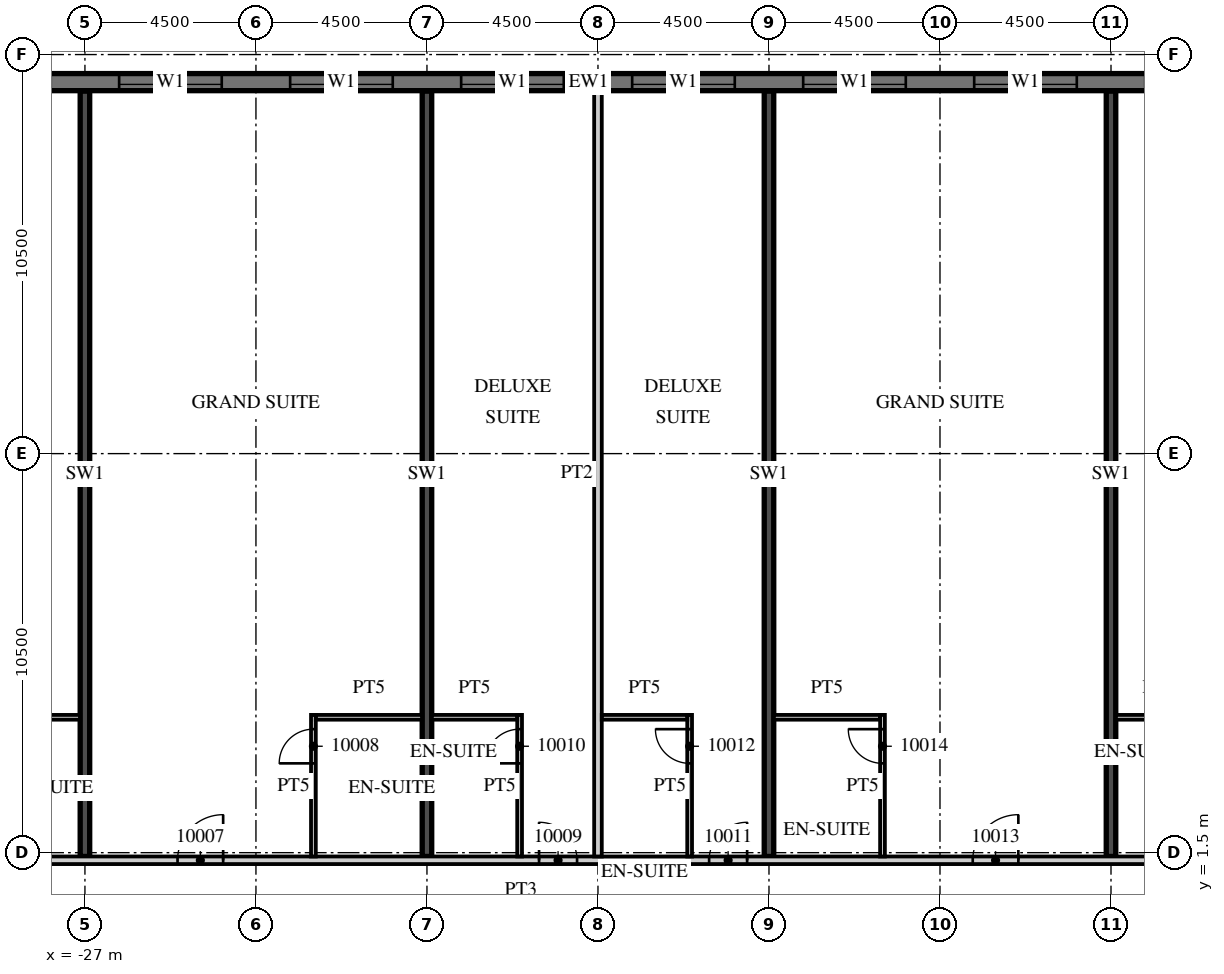
"""IFC4 building model, lengths in metres.
Left out: names, types, materials, properties, quantities, classifications, styles, units other than length and angle.
Written with IfcOpenShell. Run it as: python <this file> out.ifc"""

import sys

from ifc_helpers import new_model, si_unit, direction, frame, frame_2d, origin, place, context, subcontext, project, spatial, rectangle, extrude, element, fill, save


model = new_model("IFC4")
c1 = context("Model", 3, precision=1e-05, world=origin(), true_north=direction((0.0, 1.0)))
c2 = subcontext(c1, "Body", "Model", "MODEL_VIEW")
j1 = project(units=[si_unit("LENGTHUNIT", "METRE"), si_unit("PLANEANGLEUNIT", "RADIAN")], contexts=[c1])
p1 = place(None, origin())
s1 = spatial("IfcSite", under=j1, at=p1, CompositionType="ELEMENT")
p2 = place(p1, origin())
s2 = spatial("IfcBuilding", under=s1, at=p2, CompositionType="ELEMENT")
p3 = place(p2, frame((0.0, 0.0, 63.3)))
s3 = spatial("IfcBuildingStorey", under=s2, at=p3, CompositionType="ELEMENT", Elevation=63.3)
for number, where, z_axis, x_axis in (
    (1, (-27.0, 1.4, 0.0), (0.0, 0.0, 1.0), (0.0, 1.0, 0.0)),
    (2, (-18.0, 1.4, 0.0), (0.0, 0.0, 1.0), (0.0, 1.0, 0.0)),
    (3, (-9.0, 1.4, 0.0), (0.0, 0.0, 1.0), (0.0, 1.0, 0.0)),
    (4, (0.0, 1.4, 0.0), (0.0, 0.0, 1.0), (0.0, 1.0, 0.0)),
):
    element("IfcWall", number, at=place(p3, frame(where, z_axis=z_axis, x_axis=x_axis)), inside=s3, PredefinedType="SHEAR", context=c2, shape_type="SweptSolid", body=[
        extrude(rectangle(XDim=20.14, YDim=0.25, at=frame_2d((10.07, 0.0))), origin(), (0.0, 0.0, 1.0), 3.3),
    ])
p4 = place(p3, frame((13.5, 21.775, 0.0), z_axis=(0.0, 0.0, 1.0), x_axis=(-1.0, 0.0, 0.0)))
e5 = element("IfcWall", 5, at=p4, inside=s3, PredefinedType="SOLIDWALL", context=c2, shape_type="SweptSolid", body=[
    extrude(rectangle(XDim=54.5, YDim=0.45, at=frame_2d((27.25, 0.0))), origin(), (0.0, 0.0, 1.0), 3.02),
])
p5 = place(p4, frame((0.9, 0.0, 0.45)))
e6 = element("IfcOpeningElement", 6, at=p5, cuts=e5, PredefinedType="OPENING", context=c2, shape_type="SweptSolid", body=[
    extrude(rectangle(XDim=2.7, YDim=2.25, at=frame_2d((1.35, 1.125))), frame((0.0, 0.235, 0.0), z_axis=(0.0, -1.0, 0.0), x_axis=(1.0, 0.0, 0.0)), (0.0, 0.0, 1.0), 0.47),
])
p6 = place(p4, frame((5.4, 0.0, 0.45)))
e7 = element("IfcOpeningElement", 7, at=p6, cuts=e5, PredefinedType="OPENING", context=c2, shape_type="SweptSolid", body=[
    extrude(rectangle(XDim=2.7, YDim=2.25, at=frame_2d((1.35, 1.125))), frame((0.0, 0.235, 0.0), z_axis=(0.0, -1.0, 0.0), x_axis=(1.0, 0.0, 0.0)), (0.0, 0.0, 1.0), 0.47),
])
p7 = place(p4, frame((9.9, 0.0, 0.45)))
e8 = element("IfcOpeningElement", 8, at=p7, cuts=e5, PredefinedType="OPENING", context=c2, shape_type="SweptSolid", body=[
    extrude(rectangle(XDim=2.7, YDim=2.25, at=frame_2d((1.35, 1.125))), frame((0.0, 0.235, 0.0), z_axis=(0.0, -1.0, 0.0), x_axis=(1.0, 0.0, 0.0)), (0.0, 0.0, 1.0), 0.47),
])
p8 = place(p4, frame((14.4, 0.0, 0.45)))
e9 = element("IfcOpeningElement", 9, at=p8, cuts=e5, PredefinedType="OPENING", context=c2, shape_type="SweptSolid", body=[
    extrude(rectangle(XDim=2.7, YDim=2.25, at=frame_2d((1.35, 1.125))), frame((0.0, 0.235, 0.0), z_axis=(0.0, -1.0, 0.0), x_axis=(1.0, 0.0, 0.0)), (0.0, 0.0, 1.0), 0.47),
])
p9 = place(p4, frame((18.9, 0.0, 0.45)))
e10 = element("IfcOpeningElement", 10, at=p9, cuts=e5, PredefinedType="OPENING", context=c2, shape_type="SweptSolid", body=[
    extrude(rectangle(XDim=2.7, YDim=2.25, at=frame_2d((1.35, 1.125))), frame((0.0, 0.235, 0.0), z_axis=(0.0, -1.0, 0.0), x_axis=(1.0, 0.0, 0.0)), (0.0, 0.0, 1.0), 0.47),
])
p10 = place(p4, frame((23.4, 0.0, 0.45)))
e11 = element("IfcOpeningElement", 11, at=p10, cuts=e5, PredefinedType="OPENING", context=c2, shape_type="SweptSolid", body=[
    extrude(rectangle(XDim=2.7, YDim=2.25, at=frame_2d((1.35, 1.125))), frame((0.0, 0.235, 0.0), z_axis=(0.0, -1.0, 0.0), x_axis=(1.0, 0.0, 0.0)), (0.0, 0.0, 1.0), 0.47),
])
p11 = place(p4, frame((27.9, 0.0, 0.45)))
e12 = element("IfcOpeningElement", 12, at=p11, cuts=e5, PredefinedType="OPENING", context=c2, shape_type="SweptSolid", body=[
    extrude(rectangle(XDim=2.7, YDim=2.25, at=frame_2d((1.35, 1.125))), frame((0.0, 0.235, 0.0), z_axis=(0.0, -1.0, 0.0), x_axis=(1.0, 0.0, 0.0)), (0.0, 0.0, 1.0), 0.47),
])
p12 = place(p4, frame((32.4, 0.0, 0.45)))
e13 = element("IfcOpeningElement", 13, at=p12, cuts=e5, PredefinedType="OPENING", context=c2, shape_type="SweptSolid", body=[
    extrude(rectangle(XDim=2.7, YDim=2.25, at=frame_2d((1.35, 1.125))), frame((0.0, 0.235, 0.0), z_axis=(0.0, -1.0, 0.0), x_axis=(1.0, 0.0, 0.0)), (0.0, 0.0, 1.0), 0.47),
])
p13 = place(p4, frame((36.9, 0.0, 0.45)))
e14 = element("IfcOpeningElement", 14, at=p13, cuts=e5, PredefinedType="OPENING", context=c2, shape_type="SweptSolid", body=[
    extrude(rectangle(XDim=2.7, YDim=2.25, at=frame_2d((1.35, 1.125))), frame((0.0, 0.235, 0.0), z_axis=(0.0, -1.0, 0.0), x_axis=(1.0, 0.0, 0.0)), (0.0, 0.0, 1.0), 0.47),
])
p14 = place(p4, frame((41.4, 0.0, 0.45)))
e15 = element("IfcOpeningElement", 15, at=p14, cuts=e5, PredefinedType="OPENING", context=c2, shape_type="SweptSolid", body=[
    extrude(rectangle(XDim=2.7, YDim=2.25, at=frame_2d((1.35, 1.125))), frame((0.0, 0.235, 0.0), z_axis=(0.0, -1.0, 0.0), x_axis=(1.0, 0.0, 0.0)), (0.0, 0.0, 1.0), 0.47),
])
p15 = place(p4, frame((45.9, 0.0, 0.45)))
e16 = element("IfcOpeningElement", 16, at=p15, cuts=e5, PredefinedType="OPENING", context=c2, shape_type="SweptSolid", body=[
    extrude(rectangle(XDim=2.7, YDim=2.25, at=frame_2d((1.35, 1.125))), frame((0.0, 0.235, 0.0), z_axis=(0.0, -1.0, 0.0), x_axis=(1.0, 0.0, 0.0)), (0.0, 0.0, 1.0), 0.47),
])
p16 = place(p4, frame((50.4, 0.0, 0.45)))
e17 = element("IfcOpeningElement", 17, at=p16, cuts=e5, PredefinedType="OPENING", context=c2, shape_type="SweptSolid", body=[
    extrude(rectangle(XDim=2.7, YDim=2.25, at=frame_2d((1.35, 1.125))), frame((0.0, 0.235, 0.0), z_axis=(0.0, -1.0, 0.0), x_axis=(1.0, 0.0, 0.0)), (0.0, 0.0, 1.0), 0.47),
])
p17 = place(p3, frame((-44.55, 1.3, 0.0), z_axis=(0.0, 0.0, 1.0), x_axis=(1.0, 0.0, 0.0)))
e18 = element("IfcWall", 18, at=p17, inside=s3, PredefinedType="PARTITIONING", context=c2, shape_type="SweptSolid", body=[
    extrude(rectangle(XDim=58.05, YDim=0.2, at=frame_2d((29.025, 0.0))), origin(), (0.0, 0.0, 1.0), 3.02),
])
p18 = place(p17, frame((0.525, 0.0, 0.0)))
e19 = element("IfcOpeningElement", 19, at=p18, cuts=e18, PredefinedType="OPENING", context=c2, shape_type="SweptSolid", body=[
    extrude(rectangle(XDim=1.0, YDim=2.1, at=frame_2d((0.5, 1.05))), frame((0.0, 0.11, 0.0), z_axis=(0.0, -1.0, 0.0), x_axis=(1.0, 0.0, 0.0)), (0.0, 0.0, 1.0), 0.22),
])
p19 = place(p17, frame((6.975, 0.0, 0.0)))
e20 = element("IfcOpeningElement", 20, at=p19, cuts=e18, PredefinedType="OPENING", context=c2, shape_type="SweptSolid", body=[
    extrude(rectangle(XDim=1.0, YDim=2.1, at=frame_2d((0.5, 1.05))), frame((0.0, 0.11, 0.0), z_axis=(0.0, -1.0, 0.0), x_axis=(1.0, 0.0, 0.0)), (0.0, 0.0, 1.0), 0.22),
])
p20 = place(p17, frame((10.987, 0.0, 0.0)))
e21 = element("IfcOpeningElement", 21, at=p20, cuts=e18, PredefinedType="OPENING", context=c2, shape_type="SweptSolid", body=[
    extrude(rectangle(XDim=1.2, YDim=2.1, at=frame_2d((0.6, 1.05))), frame((0.0, 0.11, 0.0), z_axis=(0.0, -1.0, 0.0), x_axis=(1.0, 0.0, 0.0)), (0.0, 0.0, 1.0), 0.22),
])
p21 = place(p17, frame((19.987, 0.0, 0.0)))
e22 = element("IfcOpeningElement", 22, at=p21, cuts=e18, PredefinedType="OPENING", context=c2, shape_type="SweptSolid", body=[
    extrude(rectangle(XDim=1.2, YDim=2.1, at=frame_2d((0.6, 1.05))), frame((0.0, 0.11, 0.0), z_axis=(0.0, -1.0, 0.0), x_axis=(1.0, 0.0, 0.0)), (0.0, 0.0, 1.0), 0.22),
])
p22 = place(p17, frame((29.5, 0.0, 0.0)))
e23 = element("IfcOpeningElement", 23, at=p22, cuts=e18, PredefinedType="OPENING", context=c2, shape_type="SweptSolid", body=[
    extrude(rectangle(XDim=1.0, YDim=2.1, at=frame_2d((0.5, 1.05))), frame((0.0, 0.11, 0.0), z_axis=(0.0, -1.0, 0.0), x_axis=(1.0, 0.0, 0.0)), (0.0, 0.0, 1.0), 0.22),
])
p23 = place(p17, frame((33.975, 0.0, 0.0)))
e24 = element("IfcOpeningElement", 24, at=p23, cuts=e18, PredefinedType="OPENING", context=c2, shape_type="SweptSolid", body=[
    extrude(rectangle(XDim=1.0, YDim=2.1, at=frame_2d((0.5, 1.05))), frame((0.0, 0.11, 0.0), z_axis=(0.0, -1.0, 0.0), x_axis=(1.0, 0.0, 0.0)), (0.0, 0.0, 1.0), 0.22),
])
p24 = place(p17, frame((40.912, 0.0, 0.0)))
e25 = element("IfcOpeningElement", 25, at=p24, cuts=e18, PredefinedType="OPENING", context=c2, shape_type="SweptSolid", body=[
    extrude(rectangle(XDim=1.2, YDim=2.1, at=frame_2d((0.6, 1.05))), frame((0.0, 0.11, 0.0), z_axis=(0.0, -1.0, 0.0), x_axis=(1.0, 0.0, 0.0)), (0.0, 0.0, 1.0), 0.22),
])
p25 = place(p17, frame((47.5, 0.0, 0.0)))
e26 = element("IfcOpeningElement", 26, at=p25, cuts=e18, PredefinedType="OPENING", context=c2, shape_type="SweptSolid", body=[
    extrude(rectangle(XDim=1.0, YDim=2.1, at=frame_2d((0.5, 1.05))), frame((0.0, 0.11, 0.0), z_axis=(0.0, -1.0, 0.0), x_axis=(1.0, 0.0, 0.0)), (0.0, 0.0, 1.0), 0.22),
])
p26 = place(p17, frame((51.975, 0.0, 0.0)))
e27 = element("IfcOpeningElement", 27, at=p26, cuts=e18, PredefinedType="OPENING", context=c2, shape_type="SweptSolid", body=[
    extrude(rectangle(XDim=1.0, YDim=2.1, at=frame_2d((0.5, 1.05))), frame((0.0, 0.11, 0.0), z_axis=(0.0, -1.0, 0.0), x_axis=(1.0, 0.0, 0.0)), (0.0, 0.0, 1.0), 0.22),
])
p27 = place(p17, frame((56.475, 0.0, 0.0)))
e28 = element("IfcOpeningElement", 28, at=p27, cuts=e18, PredefinedType="OPENING", context=c2, shape_type="SweptSolid", body=[
    extrude(rectangle(XDim=1.0, YDim=2.1, at=frame_2d((0.5, 1.05))), frame((0.0, 0.11, 0.0), z_axis=(0.0, -1.0, 0.0), x_axis=(1.0, 0.0, 0.0)), (0.0, 0.0, 1.0), 0.22),
])
p28 = place(p3, frame((-29.925, 5.062, 0.0), z_axis=(0.0, 0.0, 1.0), x_axis=(1.0, 0.0, 0.0)))
e29 = element("IfcWall", 29, at=p28, inside=s3, PredefinedType="PARTITIONING", context=c2, shape_type="SweptSolid", body=[
    extrude(rectangle(XDim=2.8, YDim=0.125, at=frame_2d((1.4, 0.0))), origin(), (0.0, 0.0, 1.0), 3.02),
])
p29 = place(p3, frame((-20.988, 1.4, 0.0), z_axis=(0.0, 0.0, 1.0), x_axis=(0.0, 1.0, 0.0)))
e30 = element("IfcWall", 30, at=p29, inside=s3, PredefinedType="PARTITIONING", context=c2, shape_type="SweptSolid", body=[
    extrude(rectangle(XDim=3.725, YDim=0.125, at=frame_2d((1.863, 0.0))), origin(), (0.0, 0.0, 1.0), 3.02),
])
p30 = place(p29, frame((2.45, 0.0, 0.0)))
e31 = element("IfcOpeningElement", 31, at=p30, cuts=e30, PredefinedType="OPENING", context=c2, shape_type="SweptSolid", body=[
    extrude(rectangle(XDim=0.9, YDim=2.1, at=frame_2d((0.45, 1.05))), frame((0.0, 0.073, 0.0), z_axis=(0.0, -1.0, 0.0), x_axis=(1.0, 0.0, 0.0)), (0.0, 0.0, 1.0), 0.145),
])
p31 = place(p3, frame((-20.925, 5.062, 0.0), z_axis=(0.0, 0.0, 1.0), x_axis=(1.0, 0.0, 0.0)))
e32 = element("IfcWall", 32, at=p31, inside=s3, PredefinedType="PARTITIONING", context=c2, shape_type="SweptSolid", body=[
    extrude(rectangle(XDim=2.8, YDim=0.125, at=frame_2d((1.4, 0.0))), origin(), (0.0, 0.0, 1.0), 3.02),
])
p32 = place(p3, frame((-13.5, 1.4, 0.0), z_axis=(0.0, 0.0, 1.0), x_axis=(0.0, 1.0, 0.0)))
e33 = element("IfcWall", 33, at=p32, inside=s3, PredefinedType="PARTITIONING", context=c2, shape_type="SweptSolid", body=[
    extrude(rectangle(XDim=20.15, YDim=0.2, at=frame_2d((10.075, 0.0))), origin(), (0.0, 0.0, 1.0), 3.02),
])
p33 = place(p3, frame((-15.562, 1.4, 0.0), z_axis=(0.0, 0.0, 1.0), x_axis=(0.0, 1.0, 0.0)))
e34 = element("IfcWall", 34, at=p33, inside=s3, PredefinedType="PARTITIONING", context=c2, shape_type="SweptSolid", body=[
    extrude(rectangle(XDim=3.725, YDim=0.125, at=frame_2d((1.863, 0.0))), origin(), (0.0, 0.0, 1.0), 3.02),
])
p34 = place(p33, frame((2.45, 0.0, 0.0)))
e35 = element("IfcOpeningElement", 35, at=p34, cuts=e34, PredefinedType="OPENING", context=c2, shape_type="SweptSolid", body=[
    extrude(rectangle(XDim=0.9, YDim=2.1, at=frame_2d((0.45, 1.05))), frame((0.0, 0.073, 0.0), z_axis=(0.0, -1.0, 0.0), x_axis=(1.0, 0.0, 0.0)), (0.0, 0.0, 1.0), 0.145),
])
p35 = place(p3, frame((-17.875, 5.062, 0.0), z_axis=(0.0, 0.0, 1.0), x_axis=(1.0, 0.0, 0.0)))
e36 = element("IfcWall", 36, at=p35, inside=s3, PredefinedType="PARTITIONING", context=c2, shape_type="SweptSolid", body=[
    extrude(rectangle(XDim=2.25, YDim=0.125, at=frame_2d((1.125, 0.0))), origin(), (0.0, 0.0, 1.0), 3.02),
])
p36 = place(p3, frame((-11.088, 1.4, 0.0), z_axis=(0.0, 0.0, 1.0), x_axis=(0.0, 1.0, 0.0)))
e37 = element("IfcWall", 37, at=p36, inside=s3, PredefinedType="PARTITIONING", context=c2, shape_type="SweptSolid", body=[
    extrude(rectangle(XDim=3.725, YDim=0.125, at=frame_2d((1.863, 0.0))), origin(), (0.0, 0.0, 1.0), 3.02),
])
p37 = place(p36, frame((2.45, 0.0, 0.0)))
e38 = element("IfcOpeningElement", 38, at=p37, cuts=e37, PredefinedType="OPENING", context=c2, shape_type="SweptSolid", body=[
    extrude(rectangle(XDim=0.9, YDim=2.1, at=frame_2d((0.45, 1.05))), frame((0.0, 0.073, 0.0), z_axis=(0.0, -1.0, 0.0), x_axis=(1.0, 0.0, 0.0)), (0.0, 0.0, 1.0), 0.145),
])
p38 = place(p3, frame((-13.4, 5.062, 0.0), z_axis=(0.0, 0.0, 1.0), x_axis=(1.0, 0.0, 0.0)))
e39 = element("IfcWall", 39, at=p38, inside=s3, PredefinedType="PARTITIONING", context=c2, shape_type="SweptSolid", body=[
    extrude(rectangle(XDim=2.25, YDim=0.125, at=frame_2d((1.125, 0.0))), origin(), (0.0, 0.0, 1.0), 3.02),
])
p39 = place(p3, frame((-6.013, 1.4, 0.0), z_axis=(0.0, 0.0, 1.0), x_axis=(0.0, 1.0, 0.0)))
e40 = element("IfcWall", 40, at=p39, inside=s3, PredefinedType="PARTITIONING", context=c2, shape_type="SweptSolid", body=[
    extrude(rectangle(XDim=3.725, YDim=0.125, at=frame_2d((1.863, 0.0))), origin(), (0.0, 0.0, 1.0), 3.02),
])
p40 = place(p39, frame((2.45, 0.0, 0.0)))
e41 = element("IfcOpeningElement", 41, at=p40, cuts=e40, PredefinedType="OPENING", context=c2, shape_type="SweptSolid", body=[
    extrude(rectangle(XDim=0.9, YDim=2.1, at=frame_2d((0.45, 1.05))), frame((0.0, 0.073, 0.0), z_axis=(0.0, -1.0, 0.0), x_axis=(1.0, 0.0, 0.0)), (0.0, 0.0, 1.0), 0.145),
])
p41 = place(p3, frame((-8.875, 5.062, 0.0), z_axis=(0.0, 0.0, 1.0), x_axis=(1.0, 0.0, 0.0)))
e42 = element("IfcWall", 42, at=p41, inside=s3, PredefinedType="PARTITIONING", context=c2, shape_type="SweptSolid", body=[
    extrude(rectangle(XDim=2.8, YDim=0.125, at=frame_2d((1.4, 0.0))), origin(), (0.0, 0.0, 1.0), 3.02),
])
p42 = place(p3, frame((0.125, 5.062, 0.0), z_axis=(0.0, 0.0, 1.0), x_axis=(1.0, 0.0, 0.0)))
e43 = element("IfcWall", 43, at=p42, inside=s3, PredefinedType="PARTITIONING", context=c2, shape_type="SweptSolid", body=[
    extrude(rectangle(XDim=2.25, YDim=0.125, at=frame_2d((1.125, 0.0))), origin(), (0.0, 0.0, 1.0), 3.02),
])
p43 = place(p8, origin())
e44 = element("IfcWindow", 44, at=p43, inside=s3, PartitioningType="SINGLE_PANEL", PredefinedType="WINDOW", context=c2, shape_type="SweptSolid", body=[
    extrude(rectangle(XDim=2.7, YDim=2.25, at=frame_2d((1.35, 1.125))), frame((0.0, 0.09, 0.0), z_axis=(0.0, -1.0, 0.0), x_axis=(1.0, 0.0, 0.0)), (0.0, 0.0, 1.0), 0.06),
])
fill(e9, e44)
p44 = place(p9, origin())
e45 = element("IfcWindow", 45, at=p44, inside=s3, PartitioningType="SINGLE_PANEL", PredefinedType="WINDOW", context=c2, shape_type="SweptSolid", body=[
    extrude(rectangle(XDim=2.7, YDim=2.25, at=frame_2d((1.35, 1.125))), frame((0.0, 0.09, 0.0), z_axis=(0.0, -1.0, 0.0), x_axis=(1.0, 0.0, 0.0)), (0.0, 0.0, 1.0), 0.06),
])
fill(e10, e45)
p45 = place(p10, origin())
e46 = element("IfcWindow", 46, at=p45, inside=s3, PartitioningType="SINGLE_PANEL", PredefinedType="WINDOW", context=c2, shape_type="SweptSolid", body=[
    extrude(rectangle(XDim=2.7, YDim=2.25, at=frame_2d((1.35, 1.125))), frame((0.0, 0.09, 0.0), z_axis=(0.0, -1.0, 0.0), x_axis=(1.0, 0.0, 0.0)), (0.0, 0.0, 1.0), 0.06),
])
fill(e11, e46)
p46 = place(p11, origin())
e47 = element("IfcWindow", 47, at=p46, inside=s3, PartitioningType="SINGLE_PANEL", PredefinedType="WINDOW", context=c2, shape_type="SweptSolid", body=[
    extrude(rectangle(XDim=2.7, YDim=2.25, at=frame_2d((1.35, 1.125))), frame((0.0, 0.09, 0.0), z_axis=(0.0, -1.0, 0.0), x_axis=(1.0, 0.0, 0.0)), (0.0, 0.0, 1.0), 0.06),
])
fill(e12, e47)
p47 = place(p12, origin())
e48 = element("IfcWindow", 48, at=p47, inside=s3, PartitioningType="SINGLE_PANEL", PredefinedType="WINDOW", context=c2, shape_type="SweptSolid", body=[
    extrude(rectangle(XDim=2.7, YDim=2.25, at=frame_2d((1.35, 1.125))), frame((0.0, 0.09, 0.0), z_axis=(0.0, -1.0, 0.0), x_axis=(1.0, 0.0, 0.0)), (0.0, 0.0, 1.0), 0.06),
])
fill(e13, e48)
p48 = place(p13, origin())
e49 = element("IfcWindow", 49, at=p48, inside=s3, PartitioningType="SINGLE_PANEL", PredefinedType="WINDOW", context=c2, shape_type="SweptSolid", body=[
    extrude(rectangle(XDim=2.7, YDim=2.25, at=frame_2d((1.35, 1.125))), frame((0.0, 0.09, 0.0), z_axis=(0.0, -1.0, 0.0), x_axis=(1.0, 0.0, 0.0)), (0.0, 0.0, 1.0), 0.06),
])
fill(e14, e49)
p49 = place(p21, origin())
e50 = element("IfcDoor", 50, at=p49, inside=s3, OperationType="SINGLE_SWING_RIGHT", PredefinedType="DOOR", context=c2, shape_type="SweptSolid", body=[
    extrude(rectangle(XDim=1.2, YDim=2.1, at=frame_2d((0.6, 1.05))), frame((0.0, 0.025, 0.0), z_axis=(0.0, -1.0, 0.0), x_axis=(1.0, 0.0, 0.0)), (0.0, 0.0, 1.0), 0.05),
])
fill(e22, e50)
p50 = place(p30, origin())
e51 = element("IfcDoor", 51, at=p50, inside=s3, OperationType="SINGLE_SWING_LEFT", PredefinedType="DOOR", context=c2, shape_type="SweptSolid", body=[
    extrude(rectangle(XDim=0.9, YDim=2.1, at=frame_2d((0.45, 1.05))), frame((0.0, 0.025, 0.0), z_axis=(0.0, -1.0, 0.0), x_axis=(1.0, 0.0, 0.0)), (0.0, 0.0, 1.0), 0.05),
])
fill(e31, e51)
p51 = place(p22, origin())
e52 = element("IfcDoor", 52, at=p51, inside=s3, OperationType="SINGLE_SWING_LEFT", PredefinedType="DOOR", context=c2, shape_type="SweptSolid", body=[
    extrude(rectangle(XDim=1.0, YDim=2.1, at=frame_2d((0.5, 1.05))), frame((0.0, 0.025, 0.0), z_axis=(0.0, -1.0, 0.0), x_axis=(1.0, 0.0, 0.0)), (0.0, 0.0, 1.0), 0.05),
])
fill(e23, e52)
p52 = place(p34, origin())
e53 = element("IfcDoor", 53, at=p52, inside=s3, OperationType="SINGLE_SWING_LEFT", PredefinedType="DOOR", context=c2, shape_type="SweptSolid", body=[
    extrude(rectangle(XDim=0.9, YDim=2.1, at=frame_2d((0.45, 1.05))), frame((0.0, 0.025, 0.0), z_axis=(0.0, -1.0, 0.0), x_axis=(1.0, 0.0, 0.0)), (0.0, 0.0, 1.0), 0.05),
])
fill(e35, e53)
p53 = place(p23, origin())
e54 = element("IfcDoor", 54, at=p53, inside=s3, OperationType="SINGLE_SWING_RIGHT", PredefinedType="DOOR", context=c2, shape_type="SweptSolid", body=[
    extrude(rectangle(XDim=1.0, YDim=2.1, at=frame_2d((0.5, 1.05))), frame((0.0, 0.025, 0.0), z_axis=(0.0, -1.0, 0.0), x_axis=(1.0, 0.0, 0.0)), (0.0, 0.0, 1.0), 0.05),
])
fill(e24, e54)
p54 = place(p37, origin())
e55 = element("IfcDoor", 55, at=p54, inside=s3, OperationType="SINGLE_SWING_RIGHT", PredefinedType="DOOR", context=c2, shape_type="SweptSolid", body=[
    extrude(rectangle(XDim=0.9, YDim=2.1, at=frame_2d((0.45, 1.05))), frame((0.0, 0.025, 0.0), z_axis=(0.0, -1.0, 0.0), x_axis=(1.0, 0.0, 0.0)), (0.0, 0.0, 1.0), 0.05),
])
fill(e38, e55)
p55 = place(p24, origin())
e56 = element("IfcDoor", 56, at=p55, inside=s3, OperationType="SINGLE_SWING_RIGHT", PredefinedType="DOOR", context=c2, shape_type="SweptSolid", body=[
    extrude(rectangle(XDim=1.2, YDim=2.1, at=frame_2d((0.6, 1.05))), frame((0.0, 0.025, 0.0), z_axis=(0.0, -1.0, 0.0), x_axis=(1.0, 0.0, 0.0)), (0.0, 0.0, 1.0), 0.05),
])
fill(e25, e56)
p56 = place(p40, origin())
e57 = element("IfcDoor", 57, at=p56, inside=s3, OperationType="SINGLE_SWING_RIGHT", PredefinedType="DOOR", context=c2, shape_type="SweptSolid", body=[
    extrude(rectangle(XDim=0.9, YDim=2.1, at=frame_2d((0.45, 1.05))), frame((0.0, 0.025, 0.0), z_axis=(0.0, -1.0, 0.0), x_axis=(1.0, 0.0, 0.0)), (0.0, 0.0, 1.0), 0.05),
])
fill(e41, e57)
save(model, sys.argv[1])
